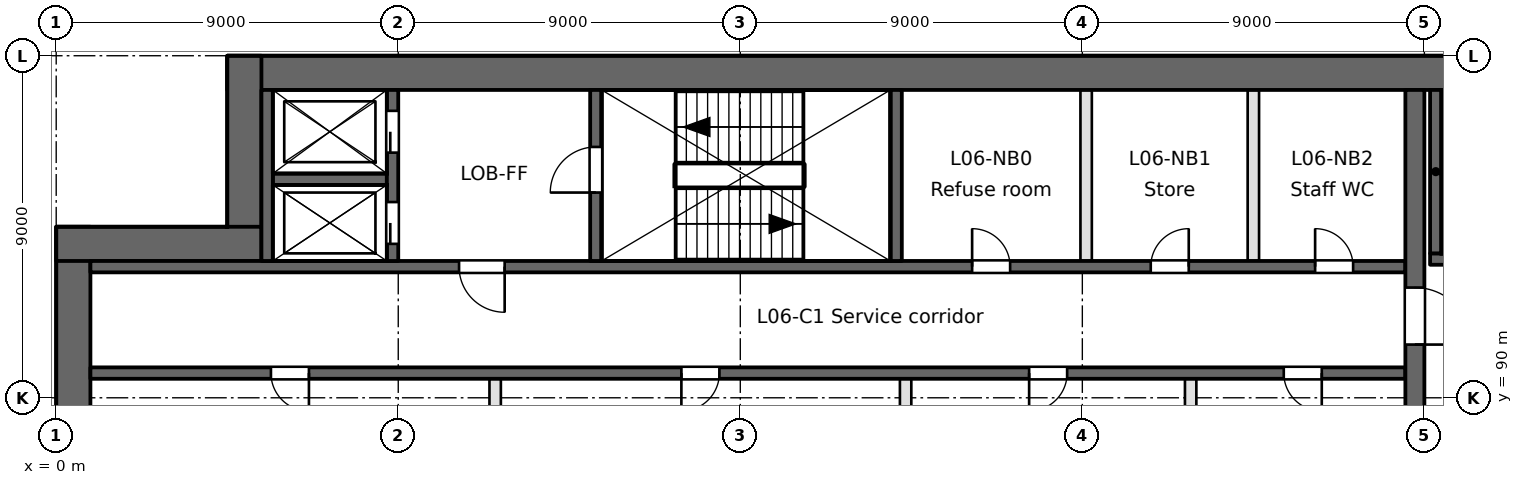
"""IFC4 building model, lengths in metres.
Left out: names, types, materials, properties, quantities, classifications, styles, units other than length and angle.
Written with IfcOpenShell. Run it as: python <this file> out.ifc"""

import sys

from ifc_helpers import new_model, si_unit, direction, frame, frame_2d, origin, place, context, subcontext, project, spatial, rectangle, extrude, element, fill, save


model = new_model("IFC4")
c1 = context("Model", 3, precision=1e-05, world=origin(), true_north=direction((0.0, 1.0)))
c2 = subcontext(c1, "Body", "Model", "MODEL_VIEW")
j1 = project(units=[si_unit("LENGTHUNIT", "METRE"), si_unit("PLANEANGLEUNIT", "RADIAN")], contexts=[c1])
p1 = place(None, origin())
s1 = spatial("IfcSite", under=j1, at=p1, CompositionType="ELEMENT")
p2 = place(p1, origin())
s2 = spatial("IfcBuilding", under=s1, at=p2, CompositionType="ELEMENT")
p3 = place(p2, frame((0.0, 0.0, 31.2)))
s3 = spatial("IfcBuildingStorey", under=s2, at=p3, CompositionType="ELEMENT", Elevation=31.2)
p4 = place(p3, frame((0.45, 94.5, 0.0), z_axis=(0.0, 0.0, 1.0), x_axis=(0.0, -1.0, 0.0)))
e1 = element("IfcWall", 1, at=p4, inside=s3, PredefinedType="SHEAR", context=c2, shape_type="SweptSolid", body=[
    extrude(rectangle(XDim=66.085, YDim=0.9, at=frame_2d((33.042, 0.0))), origin(), (0.0, 0.0, 1.0), 4.6),
])
p5 = place(p3, frame((94.5, 98.55, 0.0), z_axis=(0.0, 0.0, 1.0), x_axis=(-1.0, 0.0, 0.0)))
e2 = element("IfcWall", 2, at=p5, inside=s3, PredefinedType="SHEAR", context=c2, shape_type="SweptSolid", body=[
    extrude(rectangle(XDim=90.0, YDim=0.9, at=frame_2d((45.0, 0.0))), origin(), (0.0, 0.0, 1.0), 4.6),
])
for number, where, z_axis, x_axis in (
    (3, (4.95, 99.0, 0.0), (0.0, 0.0, 1.0), (0.0, -1.0, 0.0)),
    (4, (5.4, 94.05, 0.0), (0.0, 0.0, 1.0), (-1.0, 0.0, 0.0)),
):
    element("IfcWall", number, at=place(p3, frame(where, z_axis=z_axis, x_axis=x_axis)), inside=s3, PredefinedType="SHEAR", context=c2, shape_type="SweptSolid", body=[
        extrude(rectangle(XDim=5.4, YDim=0.9, at=frame_2d((2.7, 0.0))), origin(), (0.0, 0.0, 1.0), 4.6),
    ])
p6 = place(p3, frame((0.9, 90.65, -0.45), z_axis=(0.0, 0.0, 1.0), x_axis=(1.0, 0.0, 0.0)))
e5 = element("IfcWall", 5, at=p6, inside=s3, PredefinedType="SOLIDWALL", context=c2, shape_type="SweptSolid", body=[
    extrude(rectangle(XDim=34.6, YDim=0.3, at=frame_2d((17.3, 0.0))), origin(), (0.0, 0.0, 1.0), 4.65),
])
p7 = place(p6, frame((4.75, 0.0, 0.45)))
e6 = element("IfcOpeningElement", 6, at=p7, cuts=e5, PredefinedType="OPENING", context=c2, shape_type="SweptSolid", body=[
    extrude(rectangle(XDim=1.0, YDim=2.1, at=frame_2d((0.5, 1.05))), frame((0.0, 0.15, 0.0), z_axis=(0.0, -1.0, 0.0), x_axis=(1.0, 0.0, 0.0)), (0.0, 0.0, 1.0), 0.3),
])
p8 = place(p6, frame((24.7, 0.0, 0.45)))
e7 = element("IfcOpeningElement", 7, at=p8, cuts=e5, PredefinedType="OPENING", context=c2, shape_type="SweptSolid", body=[
    extrude(rectangle(XDim=1.0, YDim=2.1, at=frame_2d((0.5, 1.05))), frame((0.0, 0.15, 0.0), z_axis=(0.0, -1.0, 0.0), x_axis=(1.0, 0.0, 0.0)), (0.0, 0.0, 1.0), 0.3),
])
p9 = place(p6, frame((15.55, 0.0, 0.45)))
e8 = element("IfcOpeningElement", 8, at=p9, cuts=e5, PredefinedType="OPENING", context=c2, shape_type="SweptSolid", body=[
    extrude(rectangle(XDim=1.0, YDim=2.1, at=frame_2d((0.5, 1.05))), frame((0.0, 0.15, 0.0), z_axis=(0.0, -1.0, 0.0), x_axis=(1.0, 0.0, 0.0)), (0.0, 0.0, 1.0), 0.3),
])
p10 = place(p6, frame((31.4, 0.0, 0.45)))
e9 = element("IfcOpeningElement", 9, at=p10, cuts=e5, PredefinedType="OPENING", context=c2, shape_type="SweptSolid", body=[
    extrude(rectangle(XDim=1.0, YDim=2.1, at=frame_2d((0.5, 1.05))), frame((0.0, 0.15, 0.0), z_axis=(0.0, -1.0, 0.0), x_axis=(1.0, 0.0, 0.0)), (0.0, 0.0, 1.0), 0.3),
])
p11 = place(p3, frame((0.9, 93.45, -0.45), z_axis=(0.0, 0.0, 1.0), x_axis=(1.0, 0.0, 0.0)))
e10 = element("IfcWall", 10, at=p11, inside=s3, PredefinedType="SOLIDWALL", context=c2, shape_type="SweptSolid", body=[
    extrude(rectangle(XDim=34.6, YDim=0.3, at=frame_2d((17.3, 0.0))), origin(), (0.0, 0.0, 1.0), 4.65),
])
p12 = place(p11, frame((9.7, 0.0, 0.45)))
e11 = element("IfcOpeningElement", 11, at=p12, cuts=e10, PredefinedType="OPENING", context=c2, shape_type="SweptSolid", body=[
    extrude(rectangle(XDim=1.2, YDim=2.1, at=frame_2d((0.6, 1.05))), frame((0.0, 0.15, 0.0), z_axis=(0.0, -1.0, 0.0), x_axis=(1.0, 0.0, 0.0)), (0.0, 0.0, 1.0), 0.3),
])
p13 = place(p11, frame((23.2, 0.0, 0.45)))
e12 = element("IfcOpeningElement", 12, at=p13, cuts=e10, PredefinedType="OPENING", context=c2, shape_type="SweptSolid", body=[
    extrude(rectangle(XDim=1.0, YDim=2.1, at=frame_2d((0.5, 1.05))), frame((0.0, 0.15, 0.0), z_axis=(0.0, -1.0, 0.0), x_axis=(1.0, 0.0, 0.0)), (0.0, 0.0, 1.0), 0.3),
])
p14 = place(p11, frame((27.9, 0.0, 0.45)))
e13 = element("IfcOpeningElement", 13, at=p14, cuts=e10, PredefinedType="OPENING", context=c2, shape_type="SweptSolid", body=[
    extrude(rectangle(XDim=1.0, YDim=2.1, at=frame_2d((0.5, 1.05))), frame((0.0, 0.15, 0.0), z_axis=(0.0, -1.0, 0.0), x_axis=(1.0, 0.0, 0.0)), (0.0, 0.0, 1.0), 0.3),
])
p15 = place(p11, frame((32.225, 0.0, 0.45)))
e14 = element("IfcOpeningElement", 14, at=p15, cuts=e10, PredefinedType="OPENING", context=c2, shape_type="SweptSolid", body=[
    extrude(rectangle(XDim=1.0, YDim=2.1, at=frame_2d((0.5, 1.05))), frame((0.0, 0.15, 0.0), z_axis=(0.0, -1.0, 0.0), x_axis=(1.0, 0.0, 0.0)), (0.0, 0.0, 1.0), 0.3),
])
p16 = place(p3, frame((36.15, 93.65, -0.45), z_axis=(0.0, 0.0, 1.0), x_axis=(1.0, 0.0, 0.0)))
e15 = element("IfcWall", 15, at=p16, inside=s3, PredefinedType="SOLIDWALL", context=c2, shape_type="SweptSolid", body=[
    extrude(rectangle(XDim=8.2, YDim=0.3, at=frame_2d((4.1, 0.0))), origin(), (0.0, 0.0, 1.0), 4.65),
])
p17 = place(p16, frame((0.7, 0.0, 0.45)))
e16 = element("IfcOpeningElement", 16, at=p17, cuts=e15, PredefinedType="OPENING", context=c2, shape_type="SweptSolid", body=[
    extrude(rectangle(XDim=1.2, YDim=2.1, at=frame_2d((0.6, 1.05))), frame((0.0, 0.15, 0.0), z_axis=(0.0, -1.0, 0.0), x_axis=(1.0, 0.0, 0.0)), (0.0, 0.0, 1.0), 0.3),
])
p18 = place(p3, frame((5.7, 95.75, -0.45), z_axis=(0.0, 0.0, 1.0), x_axis=(1.0, 0.0, 0.0)))
e17 = element("IfcWall", 17, at=p18, inside=s3, PredefinedType="SOLIDWALL", context=c2, shape_type="SweptSolid", body=[
    extrude(rectangle(XDim=3.0, YDim=0.3, at=frame_2d((1.5, 0.0))), origin(), (0.0, 0.0, 1.0), 4.65),
])
p19 = place(p3, frame((5.55, 93.6, -0.45), z_axis=(0.0, 0.0, 1.0), x_axis=(0.0, 1.0, 0.0)))
e18 = element("IfcWall", 18, at=p19, inside=s3, PredefinedType="SOLIDWALL", context=c2, shape_type="SweptSolid", body=[
    extrude(rectangle(XDim=4.5, YDim=0.3, at=frame_2d((2.25, 0.0))), origin(), (0.0, 0.0, 1.0), 4.65),
])
p20 = place(p3, frame((8.85, 93.6, -0.45), z_axis=(0.0, 0.0, 1.0), x_axis=(0.0, 1.0, 0.0)))
e19 = element("IfcWall", 19, at=p20, inside=s3, PredefinedType="SOLIDWALL", context=c2, shape_type="SweptSolid", body=[
    extrude(rectangle(XDim=4.5, YDim=0.3, at=frame_2d((2.25, 0.0))), origin(), (0.0, 0.0, 1.0), 4.65),
])
p21 = place(p20, frame((0.45, 0.0, 0.45)))
e20 = element("IfcOpeningElement", 20, at=p21, cuts=e19, PredefinedType="OPENING", context=c2, shape_type="SweptSolid", body=[
    extrude(rectangle(XDim=1.1, YDim=2.1, at=frame_2d((0.55, 1.05))), frame((0.0, 0.15, 0.0), z_axis=(0.0, -1.0, 0.0), x_axis=(1.0, 0.0, 0.0)), (0.0, 0.0, 1.0), 0.3),
])
p22 = place(p20, frame((2.85, 0.0, 0.45)))
e21 = element("IfcOpeningElement", 21, at=p22, cuts=e19, PredefinedType="OPENING", context=c2, shape_type="SweptSolid", body=[
    extrude(rectangle(XDim=1.1, YDim=2.1, at=frame_2d((0.55, 1.05))), frame((0.0, 0.15, 0.0), z_axis=(0.0, -1.0, 0.0), x_axis=(1.0, 0.0, 0.0)), (0.0, 0.0, 1.0), 0.3),
])
p23 = place(p3, frame((11.55, 87.95, 0.0), z_axis=(0.0, 0.0, 1.0), x_axis=(0.0, 1.0, 0.0)))
e22 = element("IfcWall", 22, at=p23, inside=s3, PredefinedType="PARTITIONING", context=c2, shape_type="SweptSolid", body=[
    extrude(rectangle(XDim=2.55, YDim=0.3, at=frame_2d((1.275, 0.0))), origin(), (0.0, 0.0, 1.0), 4.2),
])
p24 = place(p3, frame((14.2, 93.6, -0.45), z_axis=(0.0, 0.0, 1.0), x_axis=(0.0, 1.0, 0.0)))
e23 = element("IfcWall", 23, at=p24, inside=s3, PredefinedType="SOLIDWALL", context=c2, shape_type="SweptSolid", body=[
    extrude(rectangle(XDim=4.5, YDim=0.3, at=frame_2d((2.25, 0.0))), origin(), (0.0, 0.0, 1.0), 4.65),
])
p25 = place(p24, frame((1.8, 0.0, 0.45)))
e24 = element("IfcOpeningElement", 24, at=p25, cuts=e23, PredefinedType="OPENING", context=c2, shape_type="SweptSolid", body=[
    extrude(rectangle(XDim=1.2, YDim=2.1, at=frame_2d((0.6, 1.05))), frame((0.0, 0.15, 0.0), z_axis=(0.0, -1.0, 0.0), x_axis=(1.0, 0.0, 0.0)), (0.0, 0.0, 1.0), 0.3),
])
p26 = place(p3, frame((22.1, 93.6, -0.45), z_axis=(0.0, 0.0, 1.0), x_axis=(0.0, 1.0, 0.0)))
e25 = element("IfcWall", 25, at=p26, inside=s3, PredefinedType="SOLIDWALL", context=c2, shape_type="SweptSolid", body=[
    extrude(rectangle(XDim=4.5, YDim=0.3, at=frame_2d((2.25, 0.0))), origin(), (0.0, 0.0, 1.0), 4.65),
])
p27 = place(p3, frame((22.35, 87.95, 0.0), z_axis=(0.0, 0.0, 1.0), x_axis=(0.0, 1.0, 0.0)))
e26 = element("IfcWall", 26, at=p27, inside=s3, PredefinedType="PARTITIONING", context=c2, shape_type="SweptSolid", body=[
    extrude(rectangle(XDim=2.55, YDim=0.3, at=frame_2d((1.275, 0.0))), origin(), (0.0, 0.0, 1.0), 4.2),
])
p28 = place(p3, frame((27.1, 93.6, 0.0), z_axis=(0.0, 0.0, 1.0), x_axis=(0.0, 1.0, 0.0)))
e27 = element("IfcWall", 27, at=p28, inside=s3, PredefinedType="PARTITIONING", context=c2, shape_type="SweptSolid", body=[
    extrude(rectangle(XDim=4.5, YDim=0.3, at=frame_2d((2.25, 0.0))), origin(), (0.0, 0.0, 1.0), 4.2),
])
p29 = place(p3, frame((29.85, 87.95, 0.0), z_axis=(0.0, 0.0, 1.0), x_axis=(0.0, 1.0, 0.0)))
e28 = element("IfcWall", 28, at=p29, inside=s3, PredefinedType="PARTITIONING", context=c2, shape_type="SweptSolid", body=[
    extrude(rectangle(XDim=2.55, YDim=0.3, at=frame_2d((1.275, 0.0))), origin(), (0.0, 0.0, 1.0), 4.2),
])
p30 = place(p3, frame((31.5, 93.6, 0.0), z_axis=(0.0, 0.0, 1.0), x_axis=(0.0, 1.0, 0.0)))
e29 = element("IfcWall", 29, at=p30, inside=s3, PredefinedType="PARTITIONING", context=c2, shape_type="SweptSolid", body=[
    extrude(rectangle(XDim=4.5, YDim=0.3, at=frame_2d((2.25, 0.0))), origin(), (0.0, 0.0, 1.0), 4.2),
])
p31 = place(p3, frame((35.75, 63.5, -0.45), z_axis=(0.0, 0.0, 1.0), x_axis=(0.0, 1.0, 0.0)))
e30 = element("IfcWall", 30, at=p31, inside=s3, PredefinedType="SOLIDWALL", context=c2, shape_type="SweptSolid", body=[
    extrude(rectangle(XDim=34.6, YDim=0.5, at=frame_2d((17.3, 0.0))), origin(), (0.0, 0.0, 1.0), 4.65),
])
p32 = place(p31, frame((9.7, 0.0, 0.45)))
e31 = element("IfcOpeningElement", 31, at=p32, cuts=e30, PredefinedType="OPENING", context=c2, shape_type="SweptSolid", body=[
    extrude(rectangle(XDim=2.4, YDim=2.1, at=frame_2d((1.2, 1.05))), frame((0.0, 0.25, 0.0), z_axis=(0.0, -1.0, 0.0), x_axis=(1.0, 0.0, 0.0)), (0.0, 0.0, 1.0), 0.5),
])
p33 = place(p31, frame((27.9, 0.0, 0.45)))
e32 = element("IfcOpeningElement", 32, at=p33, cuts=e30, PredefinedType="OPENING", context=c2, shape_type="SweptSolid", body=[
    extrude(rectangle(XDim=1.5, YDim=2.1, at=frame_2d((0.75, 1.05))), frame((0.0, 0.25, 0.0), z_axis=(0.0, -1.0, 0.0), x_axis=(1.0, 0.0, 0.0)), (0.0, 0.0, 1.0), 0.5),
])
p34 = place(p31, frame((1.5, 0.0, 0.45)))
e33 = element("IfcOpeningElement", 33, at=p34, cuts=e30, PredefinedType="OPENING", context=c2, shape_type="SweptSolid", body=[
    extrude(rectangle(XDim=1.2, YDim=2.1, at=frame_2d((0.6, 1.05))), frame((0.0, 0.25, 0.0), z_axis=(0.0, -1.0, 0.0), x_axis=(1.0, 0.0, 0.0)), (0.0, 0.0, 1.0), 0.5),
])
p35 = place(p3, frame((36.3, 93.8, -0.45), z_axis=(0.0, 0.0, 1.0), x_axis=(0.0, 1.0, 0.0)))
e34 = element("IfcWall", 34, at=p35, inside=s3, PredefinedType="SOLIDWALL", context=c2, shape_type="SweptSolid", body=[
    extrude(rectangle(XDim=4.3, YDim=0.3, at=frame_2d((2.15, 0.0))), origin(), (0.0, 0.0, 1.0), 4.65),
])
p36 = place(p21, origin())
e35 = element("IfcDoor", 35, at=p36, inside=s3, OperationType="SLIDING_TO_RIGHT", PredefinedType="DOOR", context=c2, shape_type="SweptSolid", body=[
    extrude(rectangle(XDim=1.1, YDim=2.1, at=frame_2d((0.55, 1.05))), frame((0.0, 0.025, 0.0), z_axis=(0.0, -1.0, 0.0), x_axis=(1.0, 0.0, 0.0)), (0.0, 0.0, 1.0), 0.05),
])
fill(e20, e35)
p37 = place(p22, origin())
e36 = element("IfcDoor", 36, at=p37, inside=s3, OperationType="SLIDING_TO_LEFT", PredefinedType="DOOR", context=c2, shape_type="SweptSolid", body=[
    extrude(rectangle(XDim=1.1, YDim=2.1, at=frame_2d((0.55, 1.05))), frame((0.0, 0.025, 0.0), z_axis=(0.0, -1.0, 0.0), x_axis=(1.0, 0.0, 0.0)), (0.0, 0.0, 1.0), 0.05),
])
fill(e21, e36)
p38 = place(p12, frame((1.2, 0.0, 0.0), z_axis=(0.0, 0.0, 1.0), x_axis=(-1.0, 0.0, 0.0)))
e37 = element("IfcDoor", 37, at=p38, inside=s3, OperationType="SINGLE_SWING_LEFT", PredefinedType="DOOR", context=c2, shape_type="SweptSolid", body=[
    extrude(rectangle(XDim=1.2, YDim=2.1, at=frame_2d((0.6, 1.05))), frame((0.0, 0.025, 0.0), z_axis=(0.0, -1.0, 0.0), x_axis=(1.0, 0.0, 0.0)), (0.0, 0.0, 1.0), 0.05),
])
fill(e11, e37)
p39 = place(p33, frame((1.5, 0.0, 0.0), z_axis=(0.0, 0.0, 1.0), x_axis=(-1.0, 0.0, 0.0)))
e38 = element("IfcDoor", 38, at=p39, inside=s3, OperationType="SINGLE_SWING_RIGHT", PredefinedType="DOOR", context=c2, shape_type="SweptSolid", body=[
    extrude(rectangle(XDim=1.5, YDim=2.1, at=frame_2d((0.75, 1.05))), frame((0.0, 0.025, 0.0), z_axis=(0.0, -1.0, 0.0), x_axis=(1.0, 0.0, 0.0)), (0.0, 0.0, 1.0), 0.05),
])
fill(e32, e38)
p40 = place(p25, origin())
e39 = element("IfcDoor", 39, at=p40, inside=s3, OperationType="SINGLE_SWING_LEFT", PredefinedType="DOOR", context=c2, shape_type="SweptSolid", body=[
    extrude(rectangle(XDim=1.2, YDim=2.1, at=frame_2d((0.6, 1.05))), frame((0.0, 0.025, 0.0), z_axis=(0.0, -1.0, 0.0), x_axis=(1.0, 0.0, 0.0)), (0.0, 0.0, 1.0), 0.05),
])
fill(e24, e39)
p41 = place(p7, frame((1.0, 0.0, 0.0), z_axis=(0.0, 0.0, 1.0), x_axis=(-1.0, 0.0, 0.0)))
e40 = element("IfcDoor", 40, at=p41, inside=s3, OperationType="SINGLE_SWING_LEFT", PredefinedType="DOOR", context=c2, shape_type="SweptSolid", body=[
    extrude(rectangle(XDim=1.0, YDim=2.1, at=frame_2d((0.5, 1.05))), frame((0.0, 0.025, 0.0), z_axis=(0.0, -1.0, 0.0), x_axis=(1.0, 0.0, 0.0)), (0.0, 0.0, 1.0), 0.05),
])
fill(e6, e40)
p42 = place(p8, frame((1.0, 0.0, 0.0), z_axis=(0.0, 0.0, 1.0), x_axis=(-1.0, 0.0, 0.0)))
e41 = element("IfcDoor", 41, at=p42, inside=s3, OperationType="SINGLE_SWING_RIGHT", PredefinedType="DOOR", context=c2, shape_type="SweptSolid", body=[
    extrude(rectangle(XDim=1.0, YDim=2.1, at=frame_2d((0.5, 1.05))), frame((0.0, 0.025, 0.0), z_axis=(0.0, -1.0, 0.0), x_axis=(1.0, 0.0, 0.0)), (0.0, 0.0, 1.0), 0.05),
])
fill(e7, e41)
p43 = place(p9, frame((1.0, 0.0, 0.0), z_axis=(0.0, 0.0, 1.0), x_axis=(-1.0, 0.0, 0.0)))
e42 = element("IfcDoor", 42, at=p43, inside=s3, OperationType="SINGLE_SWING_RIGHT", PredefinedType="DOOR", context=c2, shape_type="SweptSolid", body=[
    extrude(rectangle(XDim=1.0, YDim=2.1, at=frame_2d((0.5, 1.05))), frame((0.0, 0.025, 0.0), z_axis=(0.0, -1.0, 0.0), x_axis=(1.0, 0.0, 0.0)), (0.0, 0.0, 1.0), 0.05),
])
fill(e8, e42)
p44 = place(p10, frame((1.0, 0.0, 0.0), z_axis=(0.0, 0.0, 1.0), x_axis=(-1.0, 0.0, 0.0)))
e43 = element("IfcDoor", 43, at=p44, inside=s3, OperationType="SINGLE_SWING_LEFT", PredefinedType="DOOR", context=c2, shape_type="SweptSolid", body=[
    extrude(rectangle(XDim=1.0, YDim=2.1, at=frame_2d((0.5, 1.05))), frame((0.0, 0.025, 0.0), z_axis=(0.0, -1.0, 0.0), x_axis=(1.0, 0.0, 0.0)), (0.0, 0.0, 1.0), 0.05),
])
fill(e9, e43)
p45 = place(p13, origin())
e44 = element("IfcDoor", 44, at=p45, inside=s3, OperationType="SINGLE_SWING_LEFT", PredefinedType="DOOR", context=c2, shape_type="SweptSolid", body=[
    extrude(rectangle(XDim=1.0, YDim=2.1, at=frame_2d((0.5, 1.05))), frame((0.0, 0.025, 0.0), z_axis=(0.0, -1.0, 0.0), x_axis=(1.0, 0.0, 0.0)), (0.0, 0.0, 1.0), 0.05),
])
fill(e12, e44)
p46 = place(p14, origin())
e45 = element("IfcDoor", 45, at=p46, inside=s3, OperationType="SINGLE_SWING_RIGHT", PredefinedType="DOOR", context=c2, shape_type="SweptSolid", body=[
    extrude(rectangle(XDim=1.0, YDim=2.1, at=frame_2d((0.5, 1.05))), frame((0.0, 0.025, 0.0), z_axis=(0.0, -1.0, 0.0), x_axis=(1.0, 0.0, 0.0)), (0.0, 0.0, 1.0), 0.05),
])
fill(e13, e45)
p47 = place(p15, origin())
e46 = element("IfcDoor", 46, at=p47, inside=s3, OperationType="SINGLE_SWING_LEFT", PredefinedType="DOOR", context=c2, shape_type="SweptSolid", body=[
    extrude(rectangle(XDim=1.0, YDim=2.1, at=frame_2d((0.5, 1.05))), frame((0.0, 0.025, 0.0), z_axis=(0.0, -1.0, 0.0), x_axis=(1.0, 0.0, 0.0)), (0.0, 0.0, 1.0), 0.05),
])
fill(e14, e46)
save(model, sys.argv[1])
